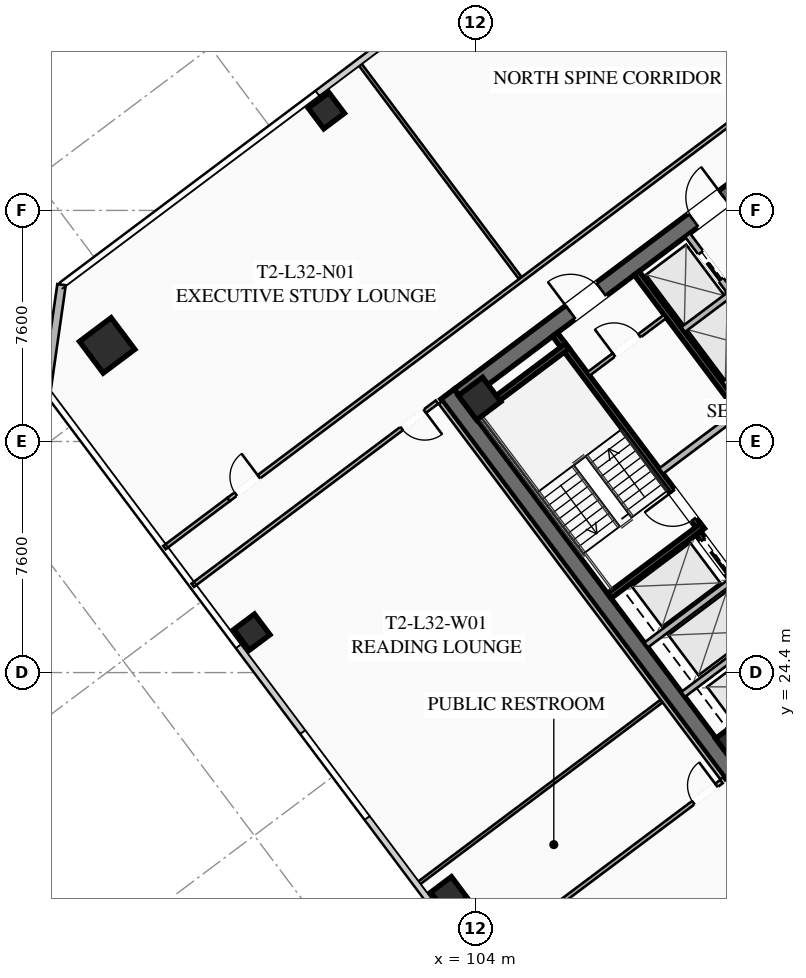
"""IFC4 building model, lengths in metres.
Left out: names, types, materials, properties, quantities, classifications, styles, units other than length and angle.
Written with IfcOpenShell. Run it as: python <this file> out.ifc"""

import sys

from ifc_helpers import new_model, si_unit, direction, frame, frame_2d, origin, origin_2d, place, context, subcontext, project, spatial, rectangle, hollow_rectangle, extrude, element, fill, save


model = new_model("IFC4")
c1 = context("Model", 3, precision=1e-05, world=origin(), true_north=direction((0.0, 1.0)))
c2 = subcontext(c1, "Body", "Model", "MODEL_VIEW")
j1 = project(units=[si_unit("LENGTHUNIT", "METRE"), si_unit("PLANEANGLEUNIT", "RADIAN")], contexts=[c1])
p1 = place(None, origin())
s1 = spatial("IfcSite", under=j1, at=p1, CompositionType="ELEMENT")
p2 = place(p1, origin())
s2 = spatial("IfcBuilding", under=s1, at=p2, CompositionType="ELEMENT")
p3 = place(p2, frame((0.0, 0.0, 121.5)))
s3 = spatial("IfcBuildingStorey", under=s2, at=p3, CompositionType="ELEMENT", Elevation=121.5)
p4 = place(p3, frame((112.436, 21.077, 0.0), z_axis=(0.0, 0.0, 1.0), x_axis=(-0.600005007985, 0.799996243986, 0.0)))
e1 = element("IfcWall", 1, at=p4, inside=s3, PredefinedType="SHEAR", context=c2, shape_type="SweptSolid", body=[
    extrude(rectangle(XDim=15.6, YDim=0.55, at=frame_2d((7.8, 0.0))), origin(), (0.0, 0.0, 1.0), 3.55),
])
p5 = place(p3, frame((103.461, 33.502, 0.0), z_axis=(0.0, 0.0, 1.0), x_axis=(0.799998054672, 0.600002593761, 0.0)))
e2 = element("IfcWall", 2, at=p5, inside=s3, PredefinedType="SHEAR", context=c2, shape_type="SweptSolid", body=[
    extrude(rectangle(XDim=15.06, YDim=0.55, at=frame_2d((7.53, 0.0))), origin(), (0.0, 0.0, 1.0), 3.55),
])
p6 = place(p5, frame((4.58, 0.0, 0.0)))
e3 = element("IfcOpeningElement", 3, at=p6, cuts=e2, PredefinedType="OPENING", context=c2, shape_type="SweptSolid", body=[
    extrude(rectangle(XDim=1.25, YDim=2.25, at=frame_2d((0.625, 1.125))), frame((0.0, 0.285, 0.0), z_axis=(0.0, -1.0, 0.0), x_axis=(1.0, 0.0, 0.0)), (0.0, 0.0, 1.0), 0.57),
])
p7 = place(p5, frame((9.63, 0.0, 0.0)))
e4 = element("IfcOpeningElement", 4, at=p7, cuts=e2, PredefinedType="OPENING", context=c2, shape_type="SweptSolid", body=[
    extrude(rectangle(XDim=1.25, YDim=2.25, at=frame_2d((0.625, 1.125))), frame((0.0, 0.285, 0.0), z_axis=(0.0, -1.0, 0.0), x_axis=(1.0, 0.0, 0.0)), (0.0, 0.0, 1.0), 0.57),
])
for number, where, z_axis, x_axis in (
    (5, (112.59, 22.13, 0.0), (0.0, 0.0, 1.0), (0.8, 0.6, 0.0)),
    (6, (104.13, 33.41, 0.0), (0.0, 0.0, 1.0), (0.8, 0.6, 0.0)),
):
    element("IfcColumn", number, at=place(p3, frame(where, z_axis=z_axis, x_axis=x_axis)), inside=s3, PredefinedType="COLUMN", context=c2, shape_type="SweptSolid", body=[
        extrude(hollow_rectangle(XDim=1.0, YDim=1.0, WallThickness=0.04, at=origin_2d()), origin(), (0.0, 0.0, 1.0), 3.37),
    ])
p8 = place(p3, frame((91.88, 35.16, 0.0), z_axis=(0.0, 0.0, 1.0), x_axis=(0.799999996291, 0.600000004945, 0.0)))
e7 = element("IfcColumn", 7, at=p8, inside=s3, PredefinedType="COLUMN", context=c2, shape_type="SweptSolid", body=[
    extrude(hollow_rectangle(XDim=1.3, YDim=1.3, WallThickness=0.05, at=origin_2d()), origin(), (0.0, 0.0, 1.0), 3.37),
])
for number, where, z_axis, x_axis in (
    (8, (99.09, 42.88, 0.0), (0.0, 0.0, 1.0), (0.8, 0.6, 0.0)),
    (9, (96.64, 25.73, 0.0), (0.0, 0.0, 1.0), (0.8, 0.6, 0.0)),
    (10, (103.12, 17.09, 0.0), (0.0, 0.0, 1.0), (0.8, 0.6, 0.0)),
):
    element("IfcColumn", number, at=place(p3, frame(where, z_axis=z_axis, x_axis=x_axis)), inside=s3, PredefinedType="COLUMN", context=c2, shape_type="SweptSolid", body=[
        extrude(hollow_rectangle(XDim=0.85, YDim=0.85, WallThickness=0.035, at=origin_2d()), origin(), (0.0, 0.0, 1.0), 3.37),
    ])
p9 = place(p3, frame((89.88, 33.66, 0.0), z_axis=(0.0, 0.0, 1.0), x_axis=(0.141421356237, 0.989949493661, 0.0)))
e11 = element("IfcWall", 11, at=p9, inside=s3, PredefinedType="SOLIDWALL", context=c2, shape_type="SweptSolid", body=[
    extrude(rectangle(XDim=3.536, YDim=0.28, at=frame_2d((1.768, 0.0))), origin(), (0.0, 0.0, 1.0), 3.37),
])
p10 = place(p3, frame((111.44, 29.08, 0.0), z_axis=(0.0, 0.0, 1.0), x_axis=(-0.59999029481, 0.8000072788, 0.0)))
e12 = element("IfcWall", 12, at=p10, inside=s3, PredefinedType="SHEAR", context=c2, shape_type="SweptSolid", body=[
    extrude(rectangle(XDim=8.05, YDim=0.2, at=frame_2d((4.025, 0.0))), origin(), (0.0, 0.0, 1.0), 3.37),
])
p11 = place(p10, frame((0.45, 0.0, 0.0)))
e13 = element("IfcOpeningElement", 13, at=p11, cuts=e12, PredefinedType="OPENING", context=c2, shape_type="SweptSolid", body=[
    extrude(rectangle(XDim=1.15, YDim=2.2, at=frame_2d((0.575, 1.1))), frame((0.0, 0.11, 0.0), z_axis=(0.0, -1.0, 0.0), x_axis=(1.0, 0.0, 0.0)), (0.0, 0.0, 1.0), 0.22),
])
for number, where, z_axis, x_axis in (
    (14, (108.396, 26.922, 0.0), (0.0, 0.0, 1.0), (0.8, 0.6, 0.0)),
    (15, (103.956, 32.842, 0.0), (0.0, 0.0, 1.0), (0.8, 0.6, 0.0)),
):
    element("IfcWall", number, at=place(p3, frame(where, z_axis=z_axis, x_axis=x_axis)), inside=s3, PredefinedType="SHEAR", context=c2, shape_type="SweptSolid", body=[
        extrude(rectangle(XDim=3.83, YDim=0.2, at=frame_2d((1.915, 0.0))), origin(), (0.0, 0.0, 1.0), 3.37),
    ])
p12 = place(p3, frame((117.998, 25.936, 0.0), z_axis=(0.0, 0.0, 1.0), x_axis=(-0.600002693989, 0.799997979501, 0.0)))
e16 = element("IfcWall", 16, at=p12, inside=s3, PredefinedType="SHEAR", context=c2, shape_type="SweptSolid", body=[
    extrude(rectangle(XDim=14.5, YDim=0.2, at=frame_2d((7.25, 0.0))), origin(), (0.0, 0.0, 1.0), 3.37),
])
p13 = place(p3, frame((110.104, 31.028, 0.0), z_axis=(0.0, 0.0, 1.0), x_axis=(0.800018601094, 0.59997519774, 0.0)))
e17 = element("IfcWall", 17, at=p13, inside=s3, PredefinedType="SOLIDWALL", context=c2, shape_type="SweptSolid", body=[
    extrude(rectangle(XDim=3.15, YDim=0.22, at=frame_2d((1.575, 0.0))), origin(), (0.0, 0.0, 1.0), 2.723),
])
p14 = place(p3, frame((115.19, 23.83, 0.0), z_axis=(0.0, 0.0, 1.0), x_axis=(-0.599993943644, 0.800004542231, 0.0)))
e18 = element("IfcWall", 18, at=p14, inside=s3, PredefinedType="SHEAR", context=c2, shape_type="SweptSolid", body=[
    extrude(rectangle(XDim=6.45, YDim=0.2, at=frame_2d((3.225, 0.0))), origin(), (0.0, 0.0, 1.0), 3.37),
])
p15 = place(p14, frame((4.875, 0.0, 0.0)))
e19 = element("IfcOpeningElement", 19, at=p15, cuts=e18, PredefinedType="OPENING", context=c2, shape_type="SweptSolid", body=[
    extrude(rectangle(XDim=1.3, YDim=2.25, at=frame_2d((0.65, 1.125))), frame((0.0, 0.11, 0.0), z_axis=(0.0, -1.0, 0.0), x_axis=(1.0, 0.0, 0.0)), (0.0, 0.0, 1.0), 0.22),
])
p16 = place(p14, frame((2.875, 0.0, 0.0)))
e20 = element("IfcOpeningElement", 20, at=p16, cuts=e18, PredefinedType="OPENING", context=c2, shape_type="SweptSolid", body=[
    extrude(rectangle(XDim=1.3, YDim=2.25, at=frame_2d((0.65, 1.125))), frame((0.0, 0.11, 0.0), z_axis=(0.0, -1.0, 0.0), x_axis=(1.0, 0.0, 0.0)), (0.0, 0.0, 1.0), 0.22),
])
p17 = place(p14, frame((0.675, 0.0, 0.0)))
e21 = element("IfcOpeningElement", 21, at=p17, cuts=e18, PredefinedType="OPENING", context=c2, shape_type="SweptSolid", body=[
    extrude(rectangle(XDim=1.3, YDim=2.25, at=frame_2d((0.65, 1.125))), frame((0.0, 0.11, 0.0), z_axis=(0.0, -1.0, 0.0), x_axis=(1.0, 0.0, 0.0)), (0.0, 0.0, 1.0), 0.22),
])
for number, where, z_axis, x_axis in (
    (22, (110.826, 23.682, 0.0), (0.0, 0.0, 1.0), (0.8, 0.6, 0.0)),
    (23, (109.608, 25.306, 0.0), (0.0, 0.0, 1.0), (0.8, 0.6, 0.0)),
):
    element("IfcWall", number, at=place(p3, frame(where, z_axis=z_axis, x_axis=x_axis)), inside=s3, PredefinedType="SOLIDWALL", context=c2, shape_type="SweptSolid", body=[
        extrude(rectangle(XDim=3.48, YDim=0.2, at=frame_2d((1.74, 0.0))), origin(), (0.0, 0.0, 1.0), 3.37),
    ])
p18 = place(p3, frame((107.71, 34.22, 0.0), z_axis=(0.0, 0.0, 1.0), x_axis=(0.799981399002, 0.60002480053, 0.0)))
e24 = element("IfcWall", 24, at=p18, inside=s3, PredefinedType="PARTITIONING", context=c2, shape_type="SweptSolid", body=[
    extrude(rectangle(XDim=3.15, YDim=0.135, at=frame_2d((1.575, 0.0))), origin(), (0.0, 0.0, 1.0), 2.723),
])
p19 = place(p18, frame((1.05, 0.0, 0.0)))
e25 = element("IfcOpeningElement", 25, at=p19, cuts=e24, PredefinedType="OPENING", context=c2, shape_type="SweptSolid", body=[
    extrude(rectangle(XDim=1.05, YDim=2.2, at=frame_2d((0.525, 1.1))), frame((0.0, 0.077, 0.0), z_axis=(0.0, -1.0, 0.0), x_axis=(1.0, 0.0, 0.0)), (0.0, 0.0, 1.0), 0.155),
])
p20 = place(p3, frame((115.11, 33.27, 0.0), z_axis=(0.0, 0.0, 1.0), x_axis=(-0.600011322243, 0.799991508192, 0.0)))
e26 = element("IfcWall", 26, at=p20, inside=s3, PredefinedType="SOLIDWALL", context=c2, shape_type="SweptSolid", body=[
    extrude(rectangle(XDim=6.9, YDim=0.2, at=frame_2d((3.45, 0.0))), origin(), (0.0, 0.0, 1.0), 3.37),
])
p21 = place(p20, frame((0.575, 0.0, 0.0)))
e27 = element("IfcOpeningElement", 27, at=p21, cuts=e26, PredefinedType="OPENING", context=c2, shape_type="SweptSolid", body=[
    extrude(rectangle(XDim=1.1, YDim=2.2, at=frame_2d((0.55, 1.1))), frame((0.0, 0.11, 0.0), z_axis=(0.0, -1.0, 0.0), x_axis=(1.0, 0.0, 0.0)), (0.0, 0.0, 1.0), 0.22),
])
p22 = place(p20, frame((2.825, 0.0, 0.0)))
e28 = element("IfcOpeningElement", 28, at=p22, cuts=e26, PredefinedType="OPENING", context=c2, shape_type="SweptSolid", body=[
    extrude(rectangle(XDim=1.1, YDim=2.2, at=frame_2d((0.55, 1.1))), frame((0.0, 0.11, 0.0), z_axis=(0.0, -1.0, 0.0), x_axis=(1.0, 0.0, 0.0)), (0.0, 0.0, 1.0), 0.22),
])
p23 = place(p20, frame((5.075, 0.0, 0.0)))
e29 = element("IfcOpeningElement", 29, at=p23, cuts=e26, PredefinedType="OPENING", context=c2, shape_type="SweptSolid", body=[
    extrude(rectangle(XDim=1.1, YDim=2.2, at=frame_2d((0.55, 1.1))), frame((0.0, 0.11, 0.0), z_axis=(0.0, -1.0, 0.0), x_axis=(1.0, 0.0, 0.0)), (0.0, 0.0, 1.0), 0.22),
])
p24 = place(p3, frame((112.176, 33.882, 0.0), z_axis=(0.0, 0.0, 1.0), x_axis=(0.8, 0.6, 0.0)))
e30 = element("IfcWall", 30, at=p24, inside=s3, PredefinedType="SOLIDWALL", context=c2, shape_type="SweptSolid", body=[
    extrude(rectangle(XDim=1.88, YDim=0.2, at=frame_2d((0.94, 0.0))), origin(), (0.0, 0.0, 1.0), 3.37),
])
p25 = place(p3, frame((110.826, 35.682, 0.0), z_axis=(0.0, 0.0, 1.0), x_axis=(0.799984418148, 0.600020775241, 0.0)))
e31 = element("IfcWall", 31, at=p25, inside=s3, PredefinedType="SOLIDWALL", context=c2, shape_type="SweptSolid", body=[
    extrude(rectangle(XDim=1.88, YDim=0.2, at=frame_2d((0.94, 0.0))), origin(), (0.0, 0.0, 1.0), 3.37),
])
p26 = place(p3, frame((95.87, 30.09, 0.0), z_axis=(0.0, 0.0, 1.0), x_axis=(0.799997191971, 0.600003744021, 0.0)))
e32 = element("IfcWall", 32, at=p26, inside=s3, PredefinedType="PARTITIONING", context=c2, shape_type="SweptSolid", body=[
    extrude(rectangle(XDim=31.3, YDim=0.135, at=frame_2d((15.65, 0.0))), origin(), (0.0, 0.0, 1.0), 2.723),
])
p27 = place(p26, frame((0.3, 0.0, 0.0)))
e33 = element("IfcOpeningElement", 33, at=p27, cuts=e32, PredefinedType="OPENING", context=c2, shape_type="SweptSolid", body=[
    extrude(rectangle(XDim=0.95, YDim=2.05, at=frame_2d((0.475, 1.025))), frame((0.0, 0.077, 0.0), z_axis=(0.0, -1.0, 0.0), x_axis=(1.0, 0.0, 0.0)), (0.0, 0.0, 1.0), 0.155),
])
p28 = place(p26, frame((30.05, 0.0, 0.0)))
e34 = element("IfcOpeningElement", 34, at=p28, cuts=e32, PredefinedType="OPENING", context=c2, shape_type="SweptSolid", body=[
    extrude(rectangle(XDim=0.95, YDim=2.05, at=frame_2d((0.475, 1.025))), frame((0.0, 0.077, 0.0), z_axis=(0.0, -1.0, 0.0), x_axis=(1.0, 0.0, 0.0)), (0.0, 0.0, 1.0), 0.155),
])
p29 = place(p3, frame((93.766, 28.512, 0.0), z_axis=(0.0, 0.0, 1.0), x_axis=(0.799977721118, 0.600029704027, 0.0)))
e35 = element("IfcWall", 35, at=p29, inside=s3, PredefinedType="PARTITIONING", context=c2, shape_type="SweptSolid", body=[
    extrude(rectangle(XDim=2.63, YDim=0.135, at=frame_2d((1.315, 0.0))), origin(), (0.0, 0.0, 1.0), 2.723),
])
p30 = place(p3, frame((105.462, 37.384, 0.0), z_axis=(0.0, 0.0, 1.0), x_axis=(-0.599982344389, 0.800013241404, 0.0)))
e36 = element("IfcWall", 36, at=p30, inside=s3, PredefinedType="PARTITIONING", context=c2, shape_type="SweptSolid", body=[
    extrude(rectangle(XDim=8.85, YDim=0.11, at=frame_2d((4.425, 0.0))), origin(), (0.0, 0.0, 1.0), 2.723),
])
p31 = place(p3, frame((133.282, 32.374, 0.0), z_axis=(0.0, 0.0, 1.0), x_axis=(-0.8, -0.6, 0.0)))
e37 = element("IfcWall", 37, at=p31, inside=s3, PredefinedType="PARTITIONING", context=c2, shape_type="SweptSolid", body=[
    extrude(rectangle(XDim=31.3, YDim=0.135, at=frame_2d((15.65, 0.0))), origin(), (0.0, 0.0, 1.0), 2.723),
])
p32 = place(p31, frame((29.97, 0.0, 0.0)))
e38 = element("IfcOpeningElement", 38, at=p32, cuts=e37, PredefinedType="OPENING", context=c2, shape_type="SweptSolid", body=[
    extrude(rectangle(XDim=0.95, YDim=2.05, at=frame_2d((0.475, 1.025))), frame((0.0, 0.077, 0.0), z_axis=(0.0, -1.0, 0.0), x_axis=(1.0, 0.0, 0.0)), (0.0, 0.0, 1.0), 0.155),
])
p33 = place(p31, frame((19.151, 0.0, 0.0)))
e39 = element("IfcOpeningElement", 39, at=p33, cuts=e37, PredefinedType="OPENING", context=c2, shape_type="SweptSolid", body=[
    extrude(rectangle(XDim=0.95, YDim=2.05, at=frame_2d((0.475, 1.025))), frame((0.0, 0.077, 0.0), z_axis=(0.0, -1.0, 0.0), x_axis=(1.0, 0.0, 0.0)), (0.0, 0.0, 1.0), 0.155),
])
p34 = place(p31, frame((14.901, 0.0, 0.0)))
e40 = element("IfcOpeningElement", 40, at=p34, cuts=e37, PredefinedType="OPENING", context=c2, shape_type="SweptSolid", body=[
    extrude(rectangle(XDim=0.95, YDim=2.05, at=frame_2d((0.475, 1.025))), frame((0.0, 0.077, 0.0), z_axis=(0.0, -1.0, 0.0), x_axis=(1.0, 0.0, 0.0)), (0.0, 0.0, 1.0), 0.155),
])
p35 = place(p31, frame((10.92, 0.0, 0.0)))
e41 = element("IfcOpeningElement", 41, at=p35, cuts=e37, PredefinedType="OPENING", context=c2, shape_type="SweptSolid", body=[
    extrude(rectangle(XDim=0.95, YDim=2.05, at=frame_2d((0.475, 1.025))), frame((0.0, 0.077, 0.0), z_axis=(0.0, -1.0, 0.0), x_axis=(1.0, 0.0, 0.0)), (0.0, 0.0, 1.0), 0.155),
])
p36 = place(p31, frame((0.38, 0.0, 0.0)))
e42 = element("IfcOpeningElement", 42, at=p36, cuts=e37, PredefinedType="OPENING", context=c2, shape_type="SweptSolid", body=[
    extrude(rectangle(XDim=0.95, YDim=2.05, at=frame_2d((0.475, 1.025))), frame((0.0, 0.077, 0.0), z_axis=(0.0, -1.0, 0.0), x_axis=(1.0, 0.0, 0.0)), (0.0, 0.0, 1.0), 0.155),
])
p37 = place(p3, frame((112.104, 20.928, 0.0), z_axis=(0.0, 0.0, 1.0), x_axis=(-0.599994940075, 0.800003794918, 0.0)))
e43 = element("IfcWall", 43, at=p37, inside=s3, PredefinedType="PARTITIONING", context=c2, shape_type="SweptSolid", body=[
    extrude(rectangle(XDim=15.44, YDim=0.135, at=frame_2d((7.72, 0.0))), origin(), (0.0, 0.0, 1.0), 2.723),
])
p38 = place(p3, frame((102.728, 33.296, 0.0), z_axis=(0.0, 0.0, 1.0), x_axis=(-0.800002918023, -0.599996109283, 0.0)))
e44 = element("IfcWall", 44, at=p38, inside=s3, PredefinedType="PARTITIONING", context=c2, shape_type="SweptSolid", body=[
    extrude(rectangle(XDim=10.04, YDim=0.135, at=frame_2d((5.02, 0.0))), origin(), (0.0, 0.0, 1.0), 2.723),
])
p39 = place(p38, frame((0.5, 0.0, 0.0)))
e45 = element("IfcOpeningElement", 45, at=p39, cuts=e44, PredefinedType="OPENING", context=c2, shape_type="SweptSolid", body=[
    extrude(rectangle(XDim=0.95, YDim=2.05, at=frame_2d((0.475, 1.025))), frame((0.0, 0.077, 0.0), z_axis=(0.0, -1.0, 0.0), x_axis=(1.0, 0.0, 0.0)), (0.0, 0.0, 1.0), 0.155),
])
p40 = place(p3, frame((104.056, 14.792, 0.0), z_axis=(0.0, 0.0, 1.0), x_axis=(0.800002918023, 0.599996109283, 0.0)))
e46 = element("IfcWall", 46, at=p40, inside=s3, PredefinedType="PARTITIONING", context=c2, shape_type="SweptSolid", body=[
    extrude(rectangle(XDim=10.04, YDim=0.135, at=frame_2d((5.02, 0.0))), origin(), (0.0, 0.0, 1.0), 2.723),
])
p41 = place(p40, frame((8.88, 0.0, 0.0)))
e47 = element("IfcOpeningElement", 47, at=p41, cuts=e46, PredefinedType="OPENING", context=c2, shape_type="SweptSolid", body=[
    extrude(rectangle(XDim=0.95, YDim=2.05, at=frame_2d((0.475, 1.025))), frame((0.0, 0.077, 0.0), z_axis=(0.0, -1.0, 0.0), x_axis=(1.0, 0.0, 0.0)), (0.0, 0.0, 1.0), 0.155),
])
p42 = place(p3, frame((102.076, 17.432, 0.0), z_axis=(0.0, 0.0, 1.0), x_axis=(0.799991245945, 0.600011671896, 0.0)))
e48 = element("IfcWall", 48, at=p42, inside=s3, PredefinedType="PARTITIONING", context=c2, shape_type="SweptSolid", body=[
    extrude(rectangle(XDim=10.04, YDim=0.11, at=frame_2d((5.02, 0.0))), origin(), (0.0, 0.0, 1.0), 2.723),
])
p43 = place(p6, origin())
e49 = element("IfcDoor", 49, at=p43, inside=s3, OperationType="SINGLE_SWING_LEFT", PredefinedType="DOOR", context=c2, shape_type="SweptSolid", body=[
    extrude(rectangle(XDim=1.25, YDim=2.25, at=frame_2d((0.625, 1.125))), frame((0.0, 0.025, 0.0), z_axis=(0.0, -1.0, 0.0), x_axis=(1.0, 0.0, 0.0)), (0.0, 0.0, 1.0), 0.05),
])
fill(e3, e49)
p44 = place(p7, origin())
e50 = element("IfcDoor", 50, at=p44, inside=s3, OperationType="SINGLE_SWING_RIGHT", PredefinedType="DOOR", context=c2, shape_type="SweptSolid", body=[
    extrude(rectangle(XDim=1.25, YDim=2.25, at=frame_2d((0.625, 1.125))), frame((0.0, 0.025, 0.0), z_axis=(0.0, -1.0, 0.0), x_axis=(1.0, 0.0, 0.0)), (0.0, 0.0, 1.0), 0.05),
])
fill(e4, e50)
p45 = place(p11, origin())
e51 = element("IfcDoor", 51, at=p45, inside=s3, OperationType="SINGLE_SWING_RIGHT", PredefinedType="DOOR", context=c2, shape_type="SweptSolid", body=[
    extrude(rectangle(XDim=1.15, YDim=2.2, at=frame_2d((0.575, 1.1))), frame((0.0, 0.025, 0.0), z_axis=(0.0, -1.0, 0.0), x_axis=(1.0, 0.0, 0.0)), (0.0, 0.0, 1.0), 0.05),
])
fill(e13, e51)
p46 = place(p19, origin())
e52 = element("IfcDoor", 52, at=p46, inside=s3, OperationType="SINGLE_SWING_LEFT", PredefinedType="DOOR", context=c2, shape_type="SweptSolid", body=[
    extrude(rectangle(XDim=1.05, YDim=2.2, at=frame_2d((0.525, 1.1))), frame((0.0, 0.025, 0.0), z_axis=(0.0, -1.0, 0.0), x_axis=(1.0, 0.0, 0.0)), (0.0, 0.0, 1.0), 0.05),
])
fill(e25, e52)
p47 = place(p27, origin())
e53 = element("IfcDoor", 53, at=p47, inside=s3, OperationType="SINGLE_SWING_RIGHT", PredefinedType="DOOR", context=c2, shape_type="SweptSolid", body=[
    extrude(rectangle(XDim=0.95, YDim=2.05, at=frame_2d((0.475, 1.025))), frame((0.0, 0.025, 0.0), z_axis=(0.0, -1.0, 0.0), x_axis=(1.0, 0.0, 0.0)), (0.0, 0.0, 1.0), 0.05),
])
fill(e33, e53)
p48 = place(p39, origin())
e54 = element("IfcDoor", 54, at=p48, inside=s3, OperationType="SINGLE_SWING_LEFT", PredefinedType="DOOR", context=c2, shape_type="SweptSolid", body=[
    extrude(rectangle(XDim=0.95, YDim=2.05, at=frame_2d((0.475, 1.025))), frame((0.0, 0.025, 0.0), z_axis=(0.0, -1.0, 0.0), x_axis=(1.0, 0.0, 0.0)), (0.0, 0.0, 1.0), 0.05),
])
fill(e45, e54)
p49 = place(p41, origin())
e55 = element("IfcDoor", 55, at=p49, inside=s3, OperationType="SINGLE_SWING_RIGHT", PredefinedType="DOOR", context=c2, shape_type="SweptSolid", body=[
    extrude(rectangle(XDim=0.95, YDim=2.05, at=frame_2d((0.475, 1.025))), frame((0.0, 0.025, 0.0), z_axis=(0.0, -1.0, 0.0), x_axis=(1.0, 0.0, 0.0)), (0.0, 0.0, 1.0), 0.05),
])
fill(e47, e55)
p50 = place(p15, origin())
e56 = element("IfcDoor", 56, at=p50, inside=s3, OperationType="SLIDING_TO_LEFT", PredefinedType="DOOR", context=c2, shape_type="SweptSolid", body=[
    extrude(rectangle(XDim=1.3, YDim=2.25, at=frame_2d((0.65, 1.125))), frame((0.0, 0.025, 0.0), z_axis=(0.0, -1.0, 0.0), x_axis=(1.0, 0.0, 0.0)), (0.0, 0.0, 1.0), 0.05),
])
fill(e19, e56)
p51 = place(p23, origin())
e57 = element("IfcDoor", 57, at=p51, inside=s3, OperationType="SLIDING_TO_LEFT", PredefinedType="DOOR", context=c2, shape_type="SweptSolid", body=[
    extrude(rectangle(XDim=1.1, YDim=2.2, at=frame_2d((0.55, 1.1))), frame((0.0, 0.025, 0.0), z_axis=(0.0, -1.0, 0.0), x_axis=(1.0, 0.0, 0.0)), (0.0, 0.0, 1.0), 0.05),
])
fill(e29, e57)
save(model, sys.argv[1])
